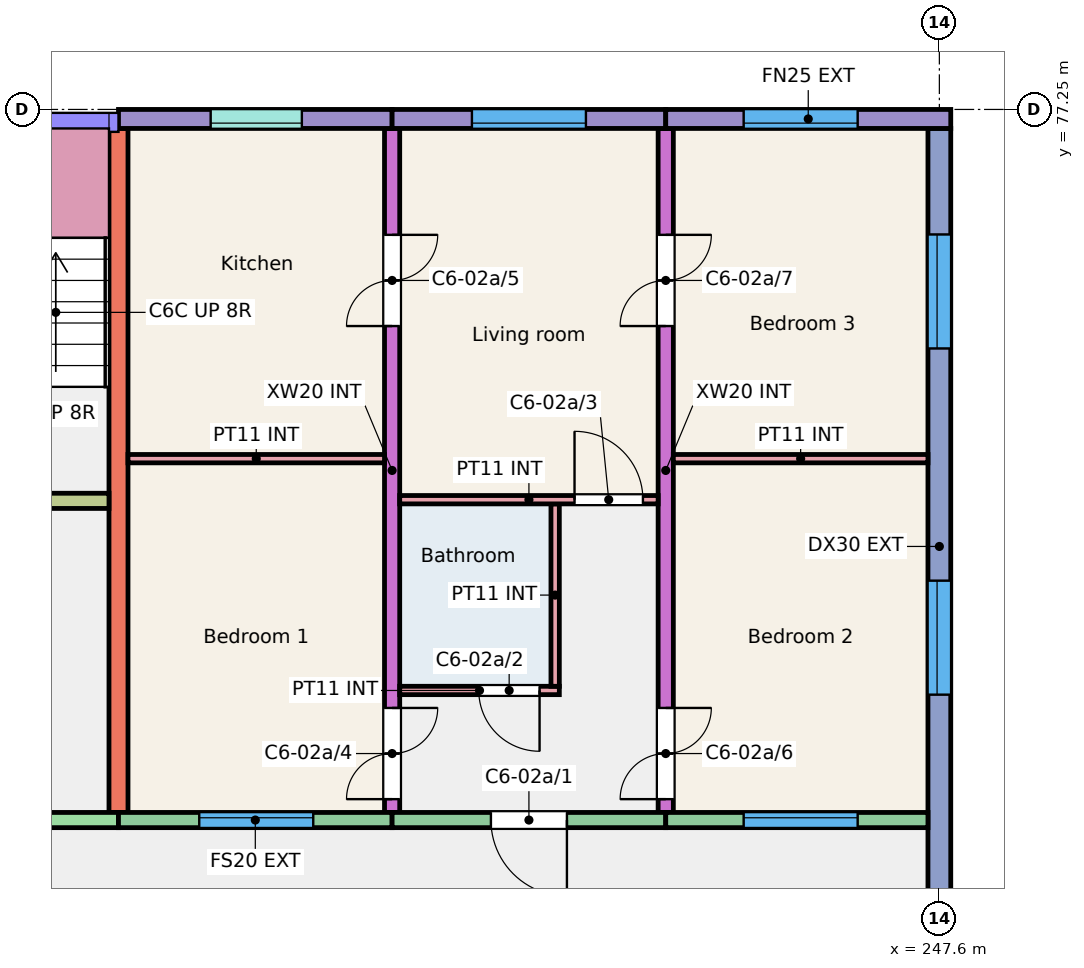
"""IFC4 building model, lengths in metres.
Left out: names, types, materials, properties, quantities, classifications, styles, units other than length and angle.
Written with IfcOpenShell. Run it as: python <this file> out.ifc"""

import sys

from ifc_helpers import new_model, si_unit, direction, frame, frame_2d, origin, place, context, subcontext, project, spatial, rectangle, extrude, element, fill, save


model = new_model("IFC4")
c1 = context("Model", 3, precision=1e-05, world=origin(), true_north=direction((0.0, 1.0)))
c2 = subcontext(c1, "Body", "Model", "MODEL_VIEW")
j1 = project(units=[si_unit("LENGTHUNIT", "METRE"), si_unit("PLANEANGLEUNIT", "RADIAN")], contexts=[c1])
p1 = place(None, origin())
s1 = spatial("IfcSite", under=j1, at=p1, CompositionType="ELEMENT")
p2 = place(p1, origin())
s2 = spatial("IfcBuilding", under=s1, at=p2, CompositionType="ELEMENT")
p3 = place(p2, frame((0.0, 0.0, 6.0)))
s3 = spatial("IfcBuildingStorey", under=s2, at=p3, CompositionType="ELEMENT", Elevation=6.0)
p4 = place(p3, frame((236.8, 68.0, 0.0), z_axis=(0.0, 0.0, 1.0), x_axis=(0.0, 1.0, 0.0)))
e1 = element("IfcWall", 1, at=p4, inside=s3, PredefinedType="SHEAR", context=c2, shape_type="SweptSolid", body=[
    extrude(rectangle(XDim=9.0, YDim=0.25, at=frame_2d((4.5, 0.0))), origin(), (0.0, 0.0, 1.0), 3.0),
])
p5 = place(p3, frame((240.4, 68.0, 0.0), z_axis=(0.0, 0.0, 1.0), x_axis=(0.0, 1.0, 0.0)))
e2 = element("IfcWall", 2, at=p5, inside=s3, PredefinedType="SHEAR", context=c2, shape_type="SweptSolid", body=[
    extrude(rectangle(XDim=9.0, YDim=0.2, at=frame_2d((4.5, 0.0))), origin(), (0.0, 0.0, 1.0), 3.0),
])
p6 = place(p5, frame((0.175, 0.0, 0.0)))
e3 = element("IfcOpeningElement", 3, at=p6, cuts=e2, PredefinedType="OPENING", context=c2, shape_type="SweptSolid", body=[
    extrude(rectangle(XDim=1.2, YDim=2.1, at=frame_2d((0.6, 1.05))), frame((0.0, 0.11, 0.0), z_axis=(0.0, -1.0, 0.0), x_axis=(1.0, 0.0, 0.0)), (0.0, 0.0, 1.0), 0.22),
])
p7 = place(p5, frame((6.4, 0.0, 0.0)))
e4 = element("IfcOpeningElement", 4, at=p7, cuts=e2, PredefinedType="OPENING", context=c2, shape_type="SweptSolid", body=[
    extrude(rectangle(XDim=1.2, YDim=2.1, at=frame_2d((0.6, 1.05))), frame((0.0, 0.11, 0.0), z_axis=(0.0, -1.0, 0.0), x_axis=(1.0, 0.0, 0.0)), (0.0, 0.0, 1.0), 0.22),
])
p8 = place(p3, frame((244.0, 68.0, 0.0), z_axis=(0.0, 0.0, 1.0), x_axis=(0.0, 1.0, 0.0)))
e5 = element("IfcWall", 5, at=p8, inside=s3, PredefinedType="SHEAR", context=c2, shape_type="SweptSolid", body=[
    extrude(rectangle(XDim=9.0, YDim=0.2, at=frame_2d((4.5, 0.0))), origin(), (0.0, 0.0, 1.0), 3.0),
])
p9 = place(p8, frame((0.175, 0.0, 0.0)))
e6 = element("IfcOpeningElement", 6, at=p9, cuts=e5, PredefinedType="OPENING", context=c2, shape_type="SweptSolid", body=[
    extrude(rectangle(XDim=1.2, YDim=2.1, at=frame_2d((0.6, 1.05))), frame((0.0, 0.11, 0.0), z_axis=(0.0, -1.0, 0.0), x_axis=(1.0, 0.0, 0.0)), (0.0, 0.0, 1.0), 0.22),
])
p10 = place(p8, frame((6.4, 0.0, 0.0)))
e7 = element("IfcOpeningElement", 7, at=p10, cuts=e5, PredefinedType="OPENING", context=c2, shape_type="SweptSolid", body=[
    extrude(rectangle(XDim=1.2, YDim=2.1, at=frame_2d((0.6, 1.05))), frame((0.0, 0.11, 0.0), z_axis=(0.0, -1.0, 0.0), x_axis=(1.0, 0.0, 0.0)), (0.0, 0.0, 1.0), 0.22),
])
p11 = place(p3, frame((247.6, 66.0, 0.0), z_axis=(0.0, 0.0, 1.0), x_axis=(0.0, 1.0, 0.0)))
e8 = element("IfcWall", 8, at=p11, inside=s3, PredefinedType="SHEAR", context=c2, shape_type="SweptSolid", body=[
    extrude(rectangle(XDim=11.0, YDim=0.3, at=frame_2d((5.5, 0.0))), origin(), (0.0, 0.0, 1.0), 3.0),
])
p12 = place(p11, frame((3.55, 0.0, 0.9)))
e9 = element("IfcOpeningElement", 9, at=p12, cuts=e8, PredefinedType="OPENING", context=c2, shape_type="SweptSolid", body=[
    extrude(rectangle(XDim=1.5, YDim=1.5, at=frame_2d((0.75, 0.75))), frame((0.0, 0.16, 0.0), z_axis=(0.0, -1.0, 0.0), x_axis=(1.0, 0.0, 0.0)), (0.0, 0.0, 1.0), 0.32),
])
p13 = place(p11, frame((8.105, 0.0, 0.9)))
e10 = element("IfcOpeningElement", 10, at=p13, cuts=e8, PredefinedType="OPENING", context=c2, shape_type="SweptSolid", body=[
    extrude(rectangle(XDim=1.5, YDim=1.5, at=frame_2d((0.75, 0.75))), frame((0.0, 0.16, 0.0), z_axis=(0.0, -1.0, 0.0), x_axis=(1.0, 0.0, 0.0)), (0.0, 0.0, 1.0), 0.32),
])
p14 = place(p3, frame((230.95, 67.9, 0.0), z_axis=(0.0, 0.0, 1.0), x_axis=(1.0, 0.0, 0.0)))
e11 = element("IfcWall", 11, at=p14, inside=s3, PredefinedType="SHEAR", context=c2, shape_type="SweptSolid", body=[
    extrude(rectangle(XDim=5.85, YDim=0.2, at=frame_2d((2.925, 0.0))), origin(), (0.0, 0.0, 1.0), 3.0),
])
p15 = place(p14, frame((2.312, 0.0, 0.0)))
e12 = element("IfcOpeningElement", 12, at=p15, cuts=e11, PredefinedType="OPENING", context=c2, shape_type="SweptSolid", body=[
    extrude(rectangle(XDim=1.1, YDim=2.1, at=frame_2d((0.55, 1.05))), frame((0.0, 0.11, 0.0), z_axis=(0.0, -1.0, 0.0), x_axis=(1.0, 0.0, 0.0)), (0.0, 0.0, 1.0), 0.22),
])
p16 = place(p3, frame((230.95, 72.1, 0.0), z_axis=(0.0, 0.0, 1.0), x_axis=(1.0, 0.0, 0.0)))
e13 = element("IfcWall", 13, at=p16, inside=s3, PredefinedType="SHEAR", context=c2, shape_type="SweptSolid", body=[
    extrude(rectangle(XDim=5.725, YDim=0.2, at=frame_2d((2.863, 0.0))), origin(), (0.0, 0.0, 1.0), 3.0),
])
p17 = place(p16, frame((3.775, 0.0, 0.0)))
e14 = element("IfcOpeningElement", 14, at=p17, cuts=e13, PredefinedType="OPENING", context=c2, shape_type="SweptSolid", body=[
    extrude(rectangle(XDim=1.0, YDim=2.1, at=frame_2d((0.5, 1.05))), frame((0.0, 0.11, 0.0), z_axis=(0.0, -1.0, 0.0), x_axis=(1.0, 0.0, 0.0)), (0.0, 0.0, 1.0), 0.22),
])
p18 = place(p16, frame((0.762, 0.0, 0.0)))
e15 = element("IfcOpeningElement", 15, at=p18, cuts=e13, PredefinedType="OPENING", context=c2, shape_type="SweptSolid", body=[
    extrude(rectangle(XDim=1.1, YDim=2.1, at=frame_2d((0.55, 1.05))), frame((0.0, 0.11, 0.0), z_axis=(0.0, -1.0, 0.0), x_axis=(1.0, 0.0, 0.0)), (0.0, 0.0, 1.0), 0.22),
])
p19 = place(p3, frame((236.8, 77.125, 0.0), z_axis=(0.0, 0.0, 1.0), x_axis=(1.0, 0.0, 0.0)))
e16 = element("IfcWall", 16, at=p19, inside=s3, PredefinedType="SOLIDWALL", context=c2, shape_type="SweptSolid", body=[
    extrude(rectangle(XDim=3.6, YDim=0.25, at=frame_2d((1.8, 0.0))), origin(), (0.0, 0.0, 1.0), 3.0),
])
p20 = place(p19, frame((1.212, 0.0, 1.1)))
e17 = element("IfcOpeningElement", 17, at=p20, cuts=e16, PredefinedType="OPENING", context=c2, shape_type="SweptSolid", body=[
    extrude(rectangle(XDim=1.2, YDim=1.3, at=frame_2d((0.6, 0.65))), frame((0.0, 0.135, 0.0), z_axis=(0.0, -1.0, 0.0), x_axis=(1.0, 0.0, 0.0)), (0.0, 0.0, 1.0), 0.27),
])
p21 = place(p3, frame((236.8, 67.9, 0.0), z_axis=(0.0, 0.0, 1.0), x_axis=(1.0, 0.0, 0.0)))
e18 = element("IfcWall", 18, at=p21, inside=s3, PredefinedType="SOLIDWALL", context=c2, shape_type="SweptSolid", body=[
    extrude(rectangle(XDim=3.6, YDim=0.2, at=frame_2d((1.8, 0.0))), origin(), (0.0, 0.0, 1.0), 3.0),
])
p22 = place(p21, frame((1.062, 0.0, 0.9)))
e19 = element("IfcOpeningElement", 19, at=p22, cuts=e18, PredefinedType="OPENING", context=c2, shape_type="SweptSolid", body=[
    extrude(rectangle(XDim=1.5, YDim=1.5, at=frame_2d((0.75, 0.75))), frame((0.0, 0.11, 0.0), z_axis=(0.0, -1.0, 0.0), x_axis=(1.0, 0.0, 0.0)), (0.0, 0.0, 1.0), 0.22),
])
p23 = place(p3, frame((240.4, 77.125, 0.0), z_axis=(0.0, 0.0, 1.0), x_axis=(1.0, 0.0, 0.0)))
e20 = element("IfcWall", 20, at=p23, inside=s3, PredefinedType="SOLIDWALL", context=c2, shape_type="SweptSolid", body=[
    extrude(rectangle(XDim=3.6, YDim=0.25, at=frame_2d((1.8, 0.0))), origin(), (0.0, 0.0, 1.0), 3.0),
])
p24 = place(p23, frame((1.05, 0.0, 0.9)))
e21 = element("IfcOpeningElement", 21, at=p24, cuts=e20, PredefinedType="OPENING", context=c2, shape_type="SweptSolid", body=[
    extrude(rectangle(XDim=1.5, YDim=1.5, at=frame_2d((0.75, 0.75))), frame((0.0, 0.135, 0.0), z_axis=(0.0, -1.0, 0.0), x_axis=(1.0, 0.0, 0.0)), (0.0, 0.0, 1.0), 0.27),
])
p25 = place(p3, frame((240.4, 67.9, 0.0), z_axis=(0.0, 0.0, 1.0), x_axis=(1.0, 0.0, 0.0)))
e22 = element("IfcWall", 22, at=p25, inside=s3, PredefinedType="SOLIDWALL", context=c2, shape_type="SweptSolid", body=[
    extrude(rectangle(XDim=3.6, YDim=0.2, at=frame_2d((1.8, 0.0))), origin(), (0.0, 0.0, 1.0), 3.0),
])
p26 = place(p25, frame((1.3, 0.0, 0.0)))
e23 = element("IfcOpeningElement", 23, at=p26, cuts=e22, PredefinedType="OPENING", context=c2, shape_type="SweptSolid", body=[
    extrude(rectangle(XDim=1.0, YDim=2.1, at=frame_2d((0.5, 1.05))), frame((0.0, 0.11, 0.0), z_axis=(0.0, -1.0, 0.0), x_axis=(1.0, 0.0, 0.0)), (0.0, 0.0, 1.0), 0.22),
])
p27 = place(p3, frame((244.0, 77.125, 0.0), z_axis=(0.0, 0.0, 1.0), x_axis=(1.0, 0.0, 0.0)))
e24 = element("IfcWall", 24, at=p27, inside=s3, PredefinedType="SOLIDWALL", context=c2, shape_type="SweptSolid", body=[
    extrude(rectangle(XDim=3.75, YDim=0.25, at=frame_2d((1.875, 0.0))), origin(), (0.0, 0.0, 1.0), 3.0),
])
p28 = place(p27, frame((1.025, 0.0, 0.9)))
e25 = element("IfcOpeningElement", 25, at=p28, cuts=e24, PredefinedType="OPENING", context=c2, shape_type="SweptSolid", body=[
    extrude(rectangle(XDim=1.5, YDim=1.5, at=frame_2d((0.75, 0.75))), frame((0.0, 0.135, 0.0), z_axis=(0.0, -1.0, 0.0), x_axis=(1.0, 0.0, 0.0)), (0.0, 0.0, 1.0), 0.27),
])
p29 = place(p3, frame((244.0, 67.9, 0.0), z_axis=(0.0, 0.0, 1.0), x_axis=(1.0, 0.0, 0.0)))
e26 = element("IfcWall", 26, at=p29, inside=s3, PredefinedType="SOLIDWALL", context=c2, shape_type="SweptSolid", body=[
    extrude(rectangle(XDim=3.45, YDim=0.2, at=frame_2d((1.725, 0.0))), origin(), (0.0, 0.0, 1.0), 3.0),
])
p30 = place(p29, frame((1.025, 0.0, 0.9)))
e27 = element("IfcOpeningElement", 27, at=p30, cuts=e26, PredefinedType="OPENING", context=c2, shape_type="SweptSolid", body=[
    extrude(rectangle(XDim=1.5, YDim=1.5, at=frame_2d((0.75, 0.75))), frame((0.0, 0.11, 0.0), z_axis=(0.0, -1.0, 0.0), x_axis=(1.0, 0.0, 0.0)), (0.0, 0.0, 1.0), 0.22),
])
p31 = place(p3, frame((240.5, 69.605, 0.0), z_axis=(0.0, 0.0, 1.0), x_axis=(1.0, 0.0, 0.0)))
e28 = element("IfcWall", 28, at=p31, inside=s3, PredefinedType="PARTITIONING", context=c2, shape_type="SweptSolid", body=[
    extrude(rectangle(XDim=2.1, YDim=0.11, at=frame_2d((1.05, 0.0))), origin(), (0.0, 0.0, 1.0), 2.8),
])
p32 = place(p31, frame((1.04, 0.0, 0.0)))
e29 = element("IfcOpeningElement", 29, at=p32, cuts=e28, PredefinedType="OPENING", context=c2, shape_type="SweptSolid", body=[
    extrude(rectangle(XDim=0.8, YDim=2.1, at=frame_2d((0.4, 1.05))), frame((0.0, 0.065, 0.0), z_axis=(0.0, -1.0, 0.0), x_axis=(1.0, 0.0, 0.0)), (0.0, 0.0, 1.0), 0.13),
])
p33 = place(p3, frame((242.545, 69.66, 0.0), z_axis=(0.0, 0.0, 1.0), x_axis=(0.0, 1.0, 0.0)))
e30 = element("IfcWall", 30, at=p33, inside=s3, PredefinedType="PARTITIONING", context=c2, shape_type="SweptSolid", body=[
    extrude(rectangle(XDim=2.4, YDim=0.11, at=frame_2d((1.2, 0.0))), origin(), (0.0, 0.0, 1.0), 2.8),
])
p34 = place(p3, frame((240.5, 72.115, 0.0), z_axis=(0.0, 0.0, 1.0), x_axis=(1.0, 0.0, 0.0)))
e31 = element("IfcWall", 31, at=p34, inside=s3, PredefinedType="PARTITIONING", context=c2, shape_type="SweptSolid", body=[
    extrude(rectangle(XDim=3.4, YDim=0.11, at=frame_2d((1.7, 0.0))), origin(), (0.0, 0.0, 1.0), 2.8),
])
p35 = place(p34, frame((2.3, 0.0, 0.0)))
e32 = element("IfcOpeningElement", 32, at=p35, cuts=e31, PredefinedType="OPENING", context=c2, shape_type="SweptSolid", body=[
    extrude(rectangle(XDim=0.9, YDim=2.1, at=frame_2d((0.45, 1.05))), frame((0.0, 0.065, 0.0), z_axis=(0.0, -1.0, 0.0), x_axis=(1.0, 0.0, 0.0)), (0.0, 0.0, 1.0), 0.13),
])
p36 = place(p3, frame((236.925, 72.655, 0.0), z_axis=(0.0, 0.0, 1.0), x_axis=(1.0, 0.0, 0.0)))
e33 = element("IfcWall", 33, at=p36, inside=s3, PredefinedType="PARTITIONING", context=c2, shape_type="SweptSolid", body=[
    extrude(rectangle(XDim=3.375, YDim=0.11, at=frame_2d((1.688, 0.0))), origin(), (0.0, 0.0, 1.0), 2.8),
])
p37 = place(p3, frame((244.1, 72.655, 0.0), z_axis=(0.0, 0.0, 1.0), x_axis=(1.0, 0.0, 0.0)))
e34 = element("IfcWall", 34, at=p37, inside=s3, PredefinedType="PARTITIONING", context=c2, shape_type="SweptSolid", body=[
    extrude(rectangle(XDim=3.35, YDim=0.11, at=frame_2d((1.675, 0.0))), origin(), (0.0, 0.0, 1.0), 2.8),
])
p38 = place(p22, origin())
e35 = element("IfcWindow", 35, at=p38, inside=s3, PartitioningType="SINGLE_PANEL", PredefinedType="WINDOW", context=c2, shape_type="SweptSolid", body=[
    extrude(rectangle(XDim=1.5, YDim=1.5, at=frame_2d((0.75, 0.75))), frame((0.0, 0.06, 0.0), z_axis=(0.0, -1.0, 0.0), x_axis=(1.0, 0.0, 0.0)), (0.0, 0.0, 1.0), 0.06),
])
fill(e19, e35)
p39 = place(p20, origin())
e36 = element("IfcWindow", 36, at=p39, inside=s3, PartitioningType="SINGLE_PANEL", PredefinedType="WINDOW", context=c2, shape_type="SweptSolid", body=[
    extrude(rectangle(XDim=1.2, YDim=1.3, at=frame_2d((0.6, 0.65))), frame((0.0, -0.025, 0.0), z_axis=(0.0, -1.0, 0.0), x_axis=(1.0, 0.0, 0.0)), (0.0, 0.0, 1.0), 0.06),
])
fill(e17, e36)
p40 = place(p30, origin())
e37 = element("IfcWindow", 37, at=p40, inside=s3, PartitioningType="SINGLE_PANEL", PredefinedType="WINDOW", context=c2, shape_type="SweptSolid", body=[
    extrude(rectangle(XDim=1.5, YDim=1.5, at=frame_2d((0.75, 0.75))), frame((0.0, 0.06, 0.0), z_axis=(0.0, -1.0, 0.0), x_axis=(1.0, 0.0, 0.0)), (0.0, 0.0, 1.0), 0.06),
])
fill(e27, e37)
p41 = place(p28, origin())
e38 = element("IfcWindow", 38, at=p41, inside=s3, PartitioningType="SINGLE_PANEL", PredefinedType="WINDOW", context=c2, shape_type="SweptSolid", body=[
    extrude(rectangle(XDim=1.5, YDim=1.5, at=frame_2d((0.75, 0.75))), frame((0.0, -0.025, 0.0), z_axis=(0.0, -1.0, 0.0), x_axis=(1.0, 0.0, 0.0)), (0.0, 0.0, 1.0), 0.06),
])
fill(e25, e38)
p42 = place(p24, origin())
e39 = element("IfcWindow", 39, at=p42, inside=s3, PartitioningType="SINGLE_PANEL", PredefinedType="WINDOW", context=c2, shape_type="SweptSolid", body=[
    extrude(rectangle(XDim=1.5, YDim=1.5, at=frame_2d((0.75, 0.75))), frame((0.0, -0.025, 0.0), z_axis=(0.0, -1.0, 0.0), x_axis=(1.0, 0.0, 0.0)), (0.0, 0.0, 1.0), 0.06),
])
fill(e21, e39)
p43 = place(p12, origin())
e40 = element("IfcWindow", 40, at=p43, inside=s3, PartitioningType="SINGLE_PANEL", PredefinedType="WINDOW", context=c2, shape_type="SweptSolid", body=[
    extrude(rectangle(XDim=1.5, YDim=1.5, at=frame_2d((0.75, 0.75))), frame((0.0, 0.06, 0.0), z_axis=(0.0, -1.0, 0.0), x_axis=(1.0, 0.0, 0.0)), (0.0, 0.0, 1.0), 0.06),
])
fill(e9, e40)
p44 = place(p13, origin())
e41 = element("IfcWindow", 41, at=p44, inside=s3, PartitioningType="SINGLE_PANEL", PredefinedType="WINDOW", context=c2, shape_type="SweptSolid", body=[
    extrude(rectangle(XDim=1.5, YDim=1.5, at=frame_2d((0.75, 0.75))), frame((0.0, 0.06, 0.0), z_axis=(0.0, -1.0, 0.0), x_axis=(1.0, 0.0, 0.0)), (0.0, 0.0, 1.0), 0.06),
])
fill(e10, e41)
p45 = place(p26, origin())
e42 = element("IfcDoor", 42, at=p45, inside=s3, OperationType="SINGLE_SWING_RIGHT", PredefinedType="DOOR", context=c2, shape_type="SweptSolid", body=[
    extrude(rectangle(XDim=1.0, YDim=2.1, at=frame_2d((0.5, 1.05))), frame((0.0, 0.025, 0.0), z_axis=(0.0, -1.0, 0.0), x_axis=(1.0, 0.0, 0.0)), (0.0, 0.0, 1.0), 0.05),
])
fill(e23, e42)
p46 = place(p32, origin())
e43 = element("IfcDoor", 43, at=p46, inside=s3, OperationType="SINGLE_SWING_RIGHT", PredefinedType="DOOR", context=c2, shape_type="SweptSolid", body=[
    extrude(rectangle(XDim=0.8, YDim=2.1, at=frame_2d((0.4, 1.05))), frame((0.0, 0.025, 0.0), z_axis=(0.0, -1.0, 0.0), x_axis=(1.0, 0.0, 0.0)), (0.0, 0.0, 1.0), 0.05),
])
fill(e29, e43)
p47 = place(p35, origin())
e44 = element("IfcDoor", 44, at=p47, inside=s3, OperationType="SINGLE_SWING_LEFT", PredefinedType="DOOR", context=c2, shape_type="SweptSolid", body=[
    extrude(rectangle(XDim=0.9, YDim=2.1, at=frame_2d((0.45, 1.05))), frame((0.0, 0.025, 0.0), z_axis=(0.0, -1.0, 0.0), x_axis=(1.0, 0.0, 0.0)), (0.0, 0.0, 1.0), 0.05),
])
fill(e32, e44)
p48 = place(p6, origin())
e45 = element("IfcDoor", 45, at=p48, inside=s3, OperationType="DOUBLE_DOOR_SINGLE_SWING", PredefinedType="DOOR", context=c2, shape_type="SweptSolid", body=[
    extrude(rectangle(XDim=1.2, YDim=2.1, at=frame_2d((0.6, 1.05))), frame((0.0, 0.025, 0.0), z_axis=(0.0, -1.0, 0.0), x_axis=(1.0, 0.0, 0.0)), (0.0, 0.0, 1.0), 0.05),
])
fill(e3, e45)
p49 = place(p7, origin())
e46 = element("IfcDoor", 46, at=p49, inside=s3, OperationType="DOUBLE_DOOR_SINGLE_SWING", PredefinedType="DOOR", context=c2, shape_type="SweptSolid", body=[
    extrude(rectangle(XDim=1.2, YDim=2.1, at=frame_2d((0.6, 1.05))), frame((0.0, 0.025, 0.0), z_axis=(0.0, -1.0, 0.0), x_axis=(1.0, 0.0, 0.0)), (0.0, 0.0, 1.0), 0.05),
])
fill(e4, e46)
p50 = place(p9, origin())
e47 = element("IfcDoor", 47, at=p50, inside=s3, OperationType="DOUBLE_DOOR_SINGLE_SWING", PredefinedType="DOOR", context=c2, shape_type="SweptSolid", body=[
    extrude(rectangle(XDim=1.2, YDim=2.1, at=frame_2d((0.6, 1.05))), frame((0.0, 0.025, 0.0), z_axis=(0.0, -1.0, 0.0), x_axis=(1.0, 0.0, 0.0)), (0.0, 0.0, 1.0), 0.05),
])
fill(e6, e47)
p51 = place(p10, origin())
e48 = element("IfcDoor", 48, at=p51, inside=s3, OperationType="DOUBLE_DOOR_SINGLE_SWING", PredefinedType="DOOR", context=c2, shape_type="SweptSolid", body=[
    extrude(rectangle(XDim=1.2, YDim=2.1, at=frame_2d((0.6, 1.05))), frame((0.0, 0.025, 0.0), z_axis=(0.0, -1.0, 0.0), x_axis=(1.0, 0.0, 0.0)), (0.0, 0.0, 1.0), 0.05),
])
fill(e7, e48)
save(model, sys.argv[1])
